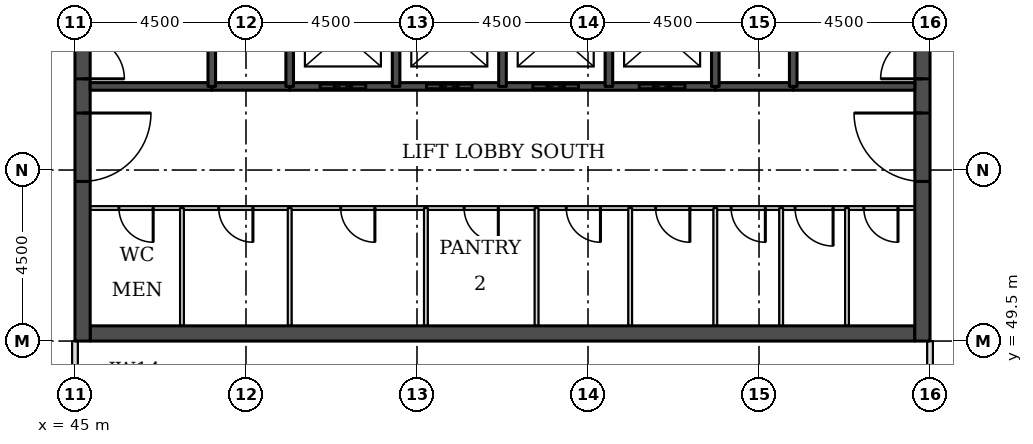
"""IFC4 building model, lengths in metres.
Left out: names, types, materials, properties, quantities, classifications, styles, units other than length and angle.
Written with IfcOpenShell. Run it as: python <this file> out.ifc"""

import sys

from ifc_helpers import new_model, si_unit, direction, frame, frame_2d, origin, place, context, subcontext, project, spatial, rectangle, extrude, element, fill, save


model = new_model("IFC4")
c1 = context("Model", 3, precision=1e-05, world=origin(), true_north=direction((0.0, 1.0)))
c2 = subcontext(c1, "Body", "Model", "MODEL_VIEW")
j1 = project(units=[si_unit("LENGTHUNIT", "METRE"), si_unit("PLANEANGLEUNIT", "RADIAN")], contexts=[c1])
p1 = place(None, origin())
s1 = spatial("IfcSite", under=j1, at=p1, CompositionType="ELEMENT")
p2 = place(p1, origin())
s2 = spatial("IfcBuilding", under=s1, at=p2, CompositionType="ELEMENT")
p3 = place(p2, frame((0.0, 0.0, 158.8)))
s3 = spatial("IfcBuildingStorey", under=s2, at=p3, CompositionType="ELEMENT", Elevation=158.8)
p4 = place(p3, frame((45.4, 49.7, 0.0), z_axis=(0.0, 0.0, 1.0), x_axis=(1.0, 0.0, 0.0)))
e1 = element("IfcWall", 1, at=p4, inside=s3, PredefinedType="SHEAR", context=c2, shape_type="SweptSolid", body=[
    extrude(rectangle(XDim=21.7, YDim=0.4, at=frame_2d((10.85, 0.0))), origin(), (0.0, 0.0, 1.0), 3.7),
])
p5 = place(p3, frame((45.2, 49.5, 0.0), z_axis=(0.0, 0.0, 1.0), x_axis=(0.0, 1.0, 0.0)))
e2 = element("IfcWall", 2, at=p5, inside=s3, PredefinedType="SHEAR", context=c2, shape_type="SweptSolid", body=[
    extrude(rectangle(XDim=22.5, YDim=0.4, at=frame_2d((11.25, 0.0))), origin(), (0.0, 0.0, 1.0), 3.7),
])
p6 = place(p5, frame((4.2, 0.0, 0.0)))
e3 = element("IfcOpeningElement", 3, at=p6, cuts=e2, PredefinedType="OPENING", context=c2, shape_type="SweptSolid", body=[
    extrude(rectangle(XDim=1.8, YDim=2.1, at=frame_2d((0.9, 1.05))), frame((0.0, 0.21, 0.0), z_axis=(0.0, -1.0, 0.0), x_axis=(1.0, 0.0, 0.0)), (0.0, 0.0, 1.0), 0.42),
])
p7 = place(p5, frame((6.9, 0.0, 0.0)))
e4 = element("IfcOpeningElement", 4, at=p7, cuts=e2, PredefinedType="OPENING", context=c2, shape_type="SweptSolid", body=[
    extrude(rectangle(XDim=1.1, YDim=2.1, at=frame_2d((0.55, 1.05))), frame((0.0, 0.21, 0.0), z_axis=(0.0, -1.0, 0.0), x_axis=(1.0, 0.0, 0.0)), (0.0, 0.0, 1.0), 0.42),
])
p8 = place(p5, frame((13.6, 0.0, 0.0)))
e5 = element("IfcOpeningElement", 5, at=p8, cuts=e2, PredefinedType="OPENING", context=c2, shape_type="SweptSolid", body=[
    extrude(rectangle(XDim=1.1, YDim=2.1, at=frame_2d((0.55, 1.05))), frame((0.0, 0.21, 0.0), z_axis=(0.0, -1.0, 0.0), x_axis=(1.0, 0.0, 0.0)), (0.0, 0.0, 1.0), 0.42),
])
p9 = place(p5, frame((16.5, 0.0, 0.0)))
e6 = element("IfcOpeningElement", 6, at=p9, cuts=e2, PredefinedType="OPENING", context=c2, shape_type="SweptSolid", body=[
    extrude(rectangle(XDim=1.8, YDim=2.1, at=frame_2d((0.9, 1.05))), frame((0.0, 0.21, 0.0), z_axis=(0.0, -1.0, 0.0), x_axis=(1.0, 0.0, 0.0)), (0.0, 0.0, 1.0), 0.42),
])
p10 = place(p3, frame((67.3, 49.5, 0.0), z_axis=(0.0, 0.0, 1.0), x_axis=(0.0, 1.0, 0.0)))
e7 = element("IfcWall", 7, at=p10, inside=s3, PredefinedType="SHEAR", context=c2, shape_type="SweptSolid", body=[
    extrude(rectangle(XDim=22.5, YDim=0.4, at=frame_2d((11.25, 0.0))), origin(), (0.0, 0.0, 1.0), 3.7),
])
p11 = place(p10, frame((4.2, 0.0, 0.0)))
e8 = element("IfcOpeningElement", 8, at=p11, cuts=e7, PredefinedType="OPENING", context=c2, shape_type="SweptSolid", body=[
    extrude(rectangle(XDim=1.8, YDim=2.1, at=frame_2d((0.9, 1.05))), frame((0.0, 0.21, 0.0), z_axis=(0.0, -1.0, 0.0), x_axis=(1.0, 0.0, 0.0)), (0.0, 0.0, 1.0), 0.42),
])
p12 = place(p10, frame((6.9, 0.0, 0.0)))
e9 = element("IfcOpeningElement", 9, at=p12, cuts=e7, PredefinedType="OPENING", context=c2, shape_type="SweptSolid", body=[
    extrude(rectangle(XDim=1.1, YDim=2.1, at=frame_2d((0.55, 1.05))), frame((0.0, 0.21, 0.0), z_axis=(0.0, -1.0, 0.0), x_axis=(1.0, 0.0, 0.0)), (0.0, 0.0, 1.0), 0.42),
])
p13 = place(p10, frame((13.6, 0.0, 0.0)))
e10 = element("IfcOpeningElement", 10, at=p13, cuts=e7, PredefinedType="OPENING", context=c2, shape_type="SweptSolid", body=[
    extrude(rectangle(XDim=1.1, YDim=2.1, at=frame_2d((0.55, 1.05))), frame((0.0, 0.21, 0.0), z_axis=(0.0, -1.0, 0.0), x_axis=(1.0, 0.0, 0.0)), (0.0, 0.0, 1.0), 0.42),
])
p14 = place(p10, frame((16.5, 0.0, 0.0)))
e11 = element("IfcOpeningElement", 11, at=p14, cuts=e7, PredefinedType="OPENING", context=c2, shape_type="SweptSolid", body=[
    extrude(rectangle(XDim=1.8, YDim=2.1, at=frame_2d((0.9, 1.05))), frame((0.0, 0.21, 0.0), z_axis=(0.0, -1.0, 0.0), x_axis=(1.0, 0.0, 0.0)), (0.0, 0.0, 1.0), 0.42),
])
p15 = place(p3, frame((67.5, 40.05, 0.0), z_axis=(0.0, 0.0, 1.0), x_axis=(0.0, 1.0, 0.0)))
e12 = element("IfcWall", 12, at=p15, inside=s3, PredefinedType="PARTITIONING", context=c2, shape_type="SweptSolid", body=[
    extrude(rectangle(XDim=9.45, YDim=0.15, at=frame_2d((4.725, 0.0))), origin(), (0.0, 0.0, 1.0), 3.022),
])
p16 = place(p3, frame((45.0, 48.0, 0.0), z_axis=(0.0, 0.0, 1.0), x_axis=(0.0, 1.0, 0.0)))
e13 = element("IfcWall", 13, at=p16, inside=s3, PredefinedType="PARTITIONING", context=c2, shape_type="SweptSolid", body=[
    extrude(rectangle(XDim=1.5, YDim=0.15, at=frame_2d((0.75, 0.0))), origin(), (0.0, 0.0, 1.0), 3.022),
])
p17 = place(p3, frame((45.4, 53.0, 0.0), z_axis=(0.0, 0.0, 1.0), x_axis=(1.0, 0.0, 0.0)))
e14 = element("IfcWall", 14, at=p17, inside=s3, PredefinedType="PARTITIONING", context=c2, shape_type="SweptSolid", body=[
    extrude(rectangle(XDim=21.7, YDim=0.1, at=frame_2d((10.85, 0.0))), origin(), (0.0, 0.0, 1.0), 3.55),
])
p18 = place(p17, frame((20.357, 0.0, 0.0)))
e15 = element("IfcOpeningElement", 15, at=p18, cuts=e14, PredefinedType="OPENING", context=c2, shape_type="SweptSolid", body=[
    extrude(rectangle(XDim=0.9, YDim=2.1, at=frame_2d((0.45, 1.05))), frame((0.0, 0.06, 0.0), z_axis=(0.0, -1.0, 0.0), x_axis=(1.0, 0.0, 0.0)), (0.0, 0.0, 1.0), 0.12),
])
p19 = place(p17, frame((18.549, 0.0, 0.0)))
e16 = element("IfcOpeningElement", 16, at=p19, cuts=e14, PredefinedType="OPENING", context=c2, shape_type="SweptSolid", body=[
    extrude(rectangle(XDim=1.0, YDim=2.1, at=frame_2d((0.5, 1.05))), frame((0.0, 0.06, 0.0), z_axis=(0.0, -1.0, 0.0), x_axis=(1.0, 0.0, 0.0)), (0.0, 0.0, 1.0), 0.12),
])
p20 = place(p17, frame((16.866, 0.0, 0.0)))
e17 = element("IfcOpeningElement", 17, at=p20, cuts=e14, PredefinedType="OPENING", context=c2, shape_type="SweptSolid", body=[
    extrude(rectangle(XDim=0.9, YDim=2.1, at=frame_2d((0.45, 1.05))), frame((0.0, 0.06, 0.0), z_axis=(0.0, -1.0, 0.0), x_axis=(1.0, 0.0, 0.0)), (0.0, 0.0, 1.0), 0.12),
])
p21 = place(p17, frame((0.758, 0.0, 0.0)))
e18 = element("IfcOpeningElement", 18, at=p21, cuts=e14, PredefinedType="OPENING", context=c2, shape_type="SweptSolid", body=[
    extrude(rectangle(XDim=0.9, YDim=2.1, at=frame_2d((0.45, 1.05))), frame((0.0, 0.06, 0.0), z_axis=(0.0, -1.0, 0.0), x_axis=(1.0, 0.0, 0.0)), (0.0, 0.0, 1.0), 0.12),
])
p22 = place(p17, frame((3.383, 0.0, 0.0)))
e19 = element("IfcOpeningElement", 19, at=p22, cuts=e14, PredefinedType="OPENING", context=c2, shape_type="SweptSolid", body=[
    extrude(rectangle(XDim=0.9, YDim=2.1, at=frame_2d((0.45, 1.05))), frame((0.0, 0.06, 0.0), z_axis=(0.0, -1.0, 0.0), x_axis=(1.0, 0.0, 0.0)), (0.0, 0.0, 1.0), 0.12),
])
p23 = place(p17, frame((6.592, 0.0, 0.0)))
e20 = element("IfcOpeningElement", 20, at=p23, cuts=e14, PredefinedType="OPENING", context=c2, shape_type="SweptSolid", body=[
    extrude(rectangle(XDim=0.9, YDim=2.1, at=frame_2d((0.45, 1.05))), frame((0.0, 0.06, 0.0), z_axis=(0.0, -1.0, 0.0), x_axis=(1.0, 0.0, 0.0)), (0.0, 0.0, 1.0), 0.12),
])
p24 = place(p17, frame((9.84, 0.0, 0.0)))
e21 = element("IfcOpeningElement", 21, at=p24, cuts=e14, PredefinedType="OPENING", context=c2, shape_type="SweptSolid", body=[
    extrude(rectangle(XDim=0.9, YDim=2.1, at=frame_2d((0.45, 1.05))), frame((0.0, 0.06, 0.0), z_axis=(0.0, -1.0, 0.0), x_axis=(1.0, 0.0, 0.0)), (0.0, 0.0, 1.0), 0.12),
])
p25 = place(p17, frame((12.528, 0.0, 0.0)))
e22 = element("IfcOpeningElement", 22, at=p25, cuts=e14, PredefinedType="OPENING", context=c2, shape_type="SweptSolid", body=[
    extrude(rectangle(XDim=0.9, YDim=2.1, at=frame_2d((0.45, 1.05))), frame((0.0, 0.06, 0.0), z_axis=(0.0, -1.0, 0.0), x_axis=(1.0, 0.0, 0.0)), (0.0, 0.0, 1.0), 0.12),
])
p26 = place(p17, frame((14.88, 0.0, 0.0)))
e23 = element("IfcOpeningElement", 23, at=p26, cuts=e14, PredefinedType="OPENING", context=c2, shape_type="SweptSolid", body=[
    extrude(rectangle(XDim=0.9, YDim=2.1, at=frame_2d((0.45, 1.05))), frame((0.0, 0.06, 0.0), z_axis=(0.0, -1.0, 0.0), x_axis=(1.0, 0.0, 0.0)), (0.0, 0.0, 1.0), 0.12),
])
for number, where, z_axis, x_axis in (
    (24, (48.6, 56.2, 0.0), (0.0, 0.0, 1.0), (1.0, 0.0, 0.0)),
    (25, (61.85, 56.2, 0.0), (0.0, 0.0, 1.0), (1.0, 0.0, 0.0)),
):
    element("IfcWall", number, at=place(p3, frame(where, z_axis=z_axis, x_axis=x_axis)), inside=s3, PredefinedType="SOLIDWALL", context=c2, shape_type="SweptSolid", body=[
        extrude(rectangle(XDim=2.05, YDim=0.2, at=frame_2d((1.025, 0.0))), origin(), (0.0, 0.0, 1.0), 3.55),
    ])
p27 = place(p3, frame((45.4, 56.2, 0.0), z_axis=(0.0, 0.0, 1.0), x_axis=(1.0, 0.0, 0.0)))
e26 = element("IfcWall", 26, at=p27, inside=s3, PredefinedType="SOLIDWALL", context=c2, shape_type="SweptSolid", body=[
    extrude(rectangle(XDim=3.2, YDim=0.2, at=frame_2d((1.6, 0.0))), origin(), (0.0, 0.0, 1.0), 3.55),
])
p28 = place(p3, frame((50.65, 56.2, 0.0), z_axis=(0.0, 0.0, 1.0), x_axis=(1.0, 0.0, 0.0)))
e27 = element("IfcWall", 27, at=p28, inside=s3, PredefinedType="SOLIDWALL", context=c2, shape_type="SweptSolid", body=[
    extrude(rectangle(XDim=11.2, YDim=0.2, at=frame_2d((5.6, 0.0))), origin(), (0.0, 0.0, 1.0), 3.55),
])
p29 = place(p28, frame((0.8, 0.0, 0.0)))
e28 = element("IfcOpeningElement", 28, at=p29, cuts=e27, PredefinedType="OPENING", context=c2, shape_type="SweptSolid", body=[
    extrude(rectangle(XDim=1.2, YDim=2.1, at=frame_2d((0.6, 1.05))), frame((0.0, 0.11, 0.0), z_axis=(0.0, -1.0, 0.0), x_axis=(1.0, 0.0, 0.0)), (0.0, 0.0, 1.0), 0.22),
])
p30 = place(p28, frame((3.6, 0.0, 0.0)))
e29 = element("IfcOpeningElement", 29, at=p30, cuts=e27, PredefinedType="OPENING", context=c2, shape_type="SweptSolid", body=[
    extrude(rectangle(XDim=1.2, YDim=2.1, at=frame_2d((0.6, 1.05))), frame((0.0, 0.11, 0.0), z_axis=(0.0, -1.0, 0.0), x_axis=(1.0, 0.0, 0.0)), (0.0, 0.0, 1.0), 0.22),
])
p31 = place(p28, frame((6.4, 0.0, 0.0)))
e30 = element("IfcOpeningElement", 30, at=p31, cuts=e27, PredefinedType="OPENING", context=c2, shape_type="SweptSolid", body=[
    extrude(rectangle(XDim=1.2, YDim=2.1, at=frame_2d((0.6, 1.05))), frame((0.0, 0.11, 0.0), z_axis=(0.0, -1.0, 0.0), x_axis=(1.0, 0.0, 0.0)), (0.0, 0.0, 1.0), 0.22),
])
p32 = place(p28, frame((9.2, 0.0, 0.0)))
e31 = element("IfcOpeningElement", 31, at=p32, cuts=e27, PredefinedType="OPENING", context=c2, shape_type="SweptSolid", body=[
    extrude(rectangle(XDim=1.2, YDim=2.1, at=frame_2d((0.6, 1.05))), frame((0.0, 0.11, 0.0), z_axis=(0.0, -1.0, 0.0), x_axis=(1.0, 0.0, 0.0)), (0.0, 0.0, 1.0), 0.22),
])
p33 = place(p3, frame((63.9, 56.2, 0.0), z_axis=(0.0, 0.0, 1.0), x_axis=(1.0, 0.0, 0.0)))
e32 = element("IfcWall", 32, at=p33, inside=s3, PredefinedType="SOLIDWALL", context=c2, shape_type="SweptSolid", body=[
    extrude(rectangle(XDim=3.2, YDim=0.2, at=frame_2d((1.6, 0.0))), origin(), (0.0, 0.0, 1.0), 3.55),
])
p34 = place(p3, frame((47.815, 49.9, 0.0), z_axis=(0.0, 0.0, 1.0), x_axis=(0.0, 1.0, 0.0)))
e33 = element("IfcWall", 33, at=p34, inside=s3, PredefinedType="PARTITIONING", context=c2, shape_type="SweptSolid", body=[
    extrude(rectangle(XDim=3.1, YDim=0.1, at=frame_2d((1.55, 0.0))), origin(), (0.0, 0.0, 1.0), 3.55),
])
p35 = place(p3, frame((48.6, 56.2, 0.0), z_axis=(0.0, 0.0, 1.0), x_axis=(0.0, 1.0, 0.0)))
e34 = element("IfcWall", 34, at=p35, inside=s3, PredefinedType="SOLIDWALL", context=c2, shape_type="SweptSolid", body=[
    extrude(rectangle(XDim=5.8, YDim=0.2, at=frame_2d((2.9, 0.0))), origin(), (0.0, 0.0, 1.0), 3.55),
])
p36 = place(p3, frame((50.65, 49.9, 0.0), z_axis=(0.0, 0.0, 1.0), x_axis=(0.0, 1.0, 0.0)))
e35 = element("IfcWall", 35, at=p36, inside=s3, PredefinedType="PARTITIONING", context=c2, shape_type="SweptSolid", body=[
    extrude(rectangle(XDim=3.1, YDim=0.1, at=frame_2d((1.55, 0.0))), origin(), (0.0, 0.0, 1.0), 3.55),
])
for number, where, z_axis, x_axis in (
    (36, (50.65, 56.2, 0.0), (0.0, 0.0, 1.0), (0.0, 1.0, 0.0)),
    (37, (53.45, 56.2, 0.0), (0.0, 0.0, 1.0), (0.0, 1.0, 0.0)),
):
    element("IfcWall", number, at=place(p3, frame(where, z_axis=z_axis, x_axis=x_axis)), inside=s3, PredefinedType="SOLIDWALL", context=c2, shape_type="SweptSolid", body=[
        extrude(rectangle(XDim=2.8, YDim=0.2, at=frame_2d((1.4, 0.0))), origin(), (0.0, 0.0, 1.0), 3.55),
    ])
p37 = place(p3, frame((54.234, 49.9, 0.0), z_axis=(0.0, 0.0, 1.0), x_axis=(0.0, 1.0, 0.0)))
e38 = element("IfcWall", 38, at=p37, inside=s3, PredefinedType="PARTITIONING", context=c2, shape_type="SweptSolid", body=[
    extrude(rectangle(XDim=3.1, YDim=0.1, at=frame_2d((1.55, 0.0))), origin(), (0.0, 0.0, 1.0), 3.55),
])
p38 = place(p3, frame((56.25, 56.2, 0.0), z_axis=(0.0, 0.0, 1.0), x_axis=(0.0, 1.0, 0.0)))
e39 = element("IfcWall", 39, at=p38, inside=s3, PredefinedType="SOLIDWALL", context=c2, shape_type="SweptSolid", body=[
    extrude(rectangle(XDim=2.8, YDim=0.2, at=frame_2d((1.4, 0.0))), origin(), (0.0, 0.0, 1.0), 3.55),
])
p39 = place(p3, frame((57.146, 49.9, 0.0), z_axis=(0.0, 0.0, 1.0), x_axis=(0.0, 1.0, 0.0)))
e40 = element("IfcWall", 40, at=p39, inside=s3, PredefinedType="PARTITIONING", context=c2, shape_type="SweptSolid", body=[
    extrude(rectangle(XDim=3.1, YDim=0.1, at=frame_2d((1.55, 0.0))), origin(), (0.0, 0.0, 1.0), 3.55),
])
p40 = place(p3, frame((59.05, 56.2, 0.0), z_axis=(0.0, 0.0, 1.0), x_axis=(0.0, 1.0, 0.0)))
e41 = element("IfcWall", 41, at=p40, inside=s3, PredefinedType="SOLIDWALL", context=c2, shape_type="SweptSolid", body=[
    extrude(rectangle(XDim=2.8, YDim=0.2, at=frame_2d((1.4, 0.0))), origin(), (0.0, 0.0, 1.0), 3.55),
])
for number, where, z_axis, x_axis in (
    (42, (59.61, 49.9, 0.0), (0.0, 0.0, 1.0), (0.0, 1.0, 0.0)),
    (43, (61.85, 49.9, 0.0), (0.0, 0.0, 1.0), (0.0, 1.0, 0.0)),
):
    element("IfcWall", number, at=place(p3, frame(where, z_axis=z_axis, x_axis=x_axis)), inside=s3, PredefinedType="PARTITIONING", context=c2, shape_type="SweptSolid", body=[
        extrude(rectangle(XDim=3.1, YDim=0.1, at=frame_2d((1.55, 0.0))), origin(), (0.0, 0.0, 1.0), 3.55),
    ])
p41 = place(p3, frame((61.85, 56.2, 0.0), z_axis=(0.0, 0.0, 1.0), x_axis=(0.0, 1.0, 0.0)))
e44 = element("IfcWall", 44, at=p41, inside=s3, PredefinedType="SOLIDWALL", context=c2, shape_type="SweptSolid", body=[
    extrude(rectangle(XDim=2.8, YDim=0.2, at=frame_2d((1.4, 0.0))), origin(), (0.0, 0.0, 1.0), 3.55),
])
p42 = place(p3, frame((63.583, 49.9, 0.0), z_axis=(0.0, 0.0, 1.0), x_axis=(0.0, 1.0, 0.0)))
e45 = element("IfcWall", 45, at=p42, inside=s3, PredefinedType="PARTITIONING", context=c2, shape_type="SweptSolid", body=[
    extrude(rectangle(XDim=3.1, YDim=0.1, at=frame_2d((1.55, 0.0))), origin(), (0.0, 0.0, 1.0), 3.55),
])
p43 = place(p3, frame((63.9, 56.2, 0.0), z_axis=(0.0, 0.0, 1.0), x_axis=(0.0, 1.0, 0.0)))
e46 = element("IfcWall", 46, at=p43, inside=s3, PredefinedType="SOLIDWALL", context=c2, shape_type="SweptSolid", body=[
    extrude(rectangle(XDim=5.8, YDim=0.2, at=frame_2d((2.9, 0.0))), origin(), (0.0, 0.0, 1.0), 3.55),
])
p44 = place(p3, frame((65.315, 49.9, 0.0), z_axis=(0.0, 0.0, 1.0), x_axis=(0.0, 1.0, 0.0)))
e47 = element("IfcWall", 47, at=p44, inside=s3, PredefinedType="PARTITIONING", context=c2, shape_type="SweptSolid", body=[
    extrude(rectangle(XDim=3.1, YDim=0.1, at=frame_2d((1.55, 0.0))), origin(), (0.0, 0.0, 1.0), 3.55),
])
p45 = place(p29, origin())
e48 = element("IfcDoor", 48, at=p45, inside=s3, OperationType="DOUBLE_DOOR_SLIDING", PredefinedType="DOOR", context=c2, shape_type="SweptSolid", body=[
    extrude(rectangle(XDim=1.2, YDim=2.1, at=frame_2d((0.6, 1.05))), frame((0.0, 0.025, 0.0), z_axis=(0.0, -1.0, 0.0), x_axis=(1.0, 0.0, 0.0)), (0.0, 0.0, 1.0), 0.05),
])
fill(e28, e48)
p46 = place(p30, origin())
e49 = element("IfcDoor", 49, at=p46, inside=s3, OperationType="DOUBLE_DOOR_SLIDING", PredefinedType="DOOR", context=c2, shape_type="SweptSolid", body=[
    extrude(rectangle(XDim=1.2, YDim=2.1, at=frame_2d((0.6, 1.05))), frame((0.0, 0.025, 0.0), z_axis=(0.0, -1.0, 0.0), x_axis=(1.0, 0.0, 0.0)), (0.0, 0.0, 1.0), 0.05),
])
fill(e29, e49)
p47 = place(p31, origin())
e50 = element("IfcDoor", 50, at=p47, inside=s3, OperationType="DOUBLE_DOOR_SLIDING", PredefinedType="DOOR", context=c2, shape_type="SweptSolid", body=[
    extrude(rectangle(XDim=1.2, YDim=2.1, at=frame_2d((0.6, 1.05))), frame((0.0, 0.025, 0.0), z_axis=(0.0, -1.0, 0.0), x_axis=(1.0, 0.0, 0.0)), (0.0, 0.0, 1.0), 0.05),
])
fill(e30, e50)
p48 = place(p32, origin())
e51 = element("IfcDoor", 51, at=p48, inside=s3, OperationType="DOUBLE_DOOR_SLIDING", PredefinedType="DOOR", context=c2, shape_type="SweptSolid", body=[
    extrude(rectangle(XDim=1.2, YDim=2.1, at=frame_2d((0.6, 1.05))), frame((0.0, 0.025, 0.0), z_axis=(0.0, -1.0, 0.0), x_axis=(1.0, 0.0, 0.0)), (0.0, 0.0, 1.0), 0.05),
])
fill(e31, e51)
p49 = place(p6, frame((1.8, 0.0, 0.0), z_axis=(0.0, 0.0, 1.0), x_axis=(-1.0, 0.0, 0.0)))
e52 = element("IfcDoor", 52, at=p49, inside=s3, OperationType="SINGLE_SWING_LEFT", PredefinedType="DOOR", context=c2, shape_type="SweptSolid", body=[
    extrude(rectangle(XDim=1.8, YDim=2.1, at=frame_2d((0.9, 1.05))), frame((0.0, 0.025, 0.0), z_axis=(0.0, -1.0, 0.0), x_axis=(1.0, 0.0, 0.0)), (0.0, 0.0, 1.0), 0.05),
])
fill(e3, e52)
p50 = place(p7, frame((1.1, 0.0, 0.0), z_axis=(0.0, 0.0, 1.0), x_axis=(-1.0, 0.0, 0.0)))
e53 = element("IfcDoor", 53, at=p50, inside=s3, OperationType="SINGLE_SWING_RIGHT", PredefinedType="DOOR", context=c2, shape_type="SweptSolid", body=[
    extrude(rectangle(XDim=1.1, YDim=2.1, at=frame_2d((0.55, 1.05))), frame((0.0, 0.025, 0.0), z_axis=(0.0, -1.0, 0.0), x_axis=(1.0, 0.0, 0.0)), (0.0, 0.0, 1.0), 0.05),
])
fill(e4, e53)
p51 = place(p11, origin())
e54 = element("IfcDoor", 54, at=p51, inside=s3, OperationType="SINGLE_SWING_RIGHT", PredefinedType="DOOR", context=c2, shape_type="SweptSolid", body=[
    extrude(rectangle(XDim=1.8, YDim=2.1, at=frame_2d((0.9, 1.05))), frame((0.0, 0.025, 0.0), z_axis=(0.0, -1.0, 0.0), x_axis=(1.0, 0.0, 0.0)), (0.0, 0.0, 1.0), 0.05),
])
fill(e8, e54)
p52 = place(p12, origin())
e55 = element("IfcDoor", 55, at=p52, inside=s3, OperationType="SINGLE_SWING_LEFT", PredefinedType="DOOR", context=c2, shape_type="SweptSolid", body=[
    extrude(rectangle(XDim=1.1, YDim=2.1, at=frame_2d((0.55, 1.05))), frame((0.0, 0.025, 0.0), z_axis=(0.0, -1.0, 0.0), x_axis=(1.0, 0.0, 0.0)), (0.0, 0.0, 1.0), 0.05),
])
fill(e9, e55)
p53 = place(p18, frame((0.9, 0.0, 0.0), z_axis=(0.0, 0.0, 1.0), x_axis=(-1.0, 0.0, 0.0)))
e56 = element("IfcDoor", 56, at=p53, inside=s3, OperationType="SINGLE_SWING_LEFT", PredefinedType="DOOR", context=c2, shape_type="SweptSolid", body=[
    extrude(rectangle(XDim=0.9, YDim=2.1, at=frame_2d((0.45, 1.05))), frame((0.0, 0.025, 0.0), z_axis=(0.0, -1.0, 0.0), x_axis=(1.0, 0.0, 0.0)), (0.0, 0.0, 1.0), 0.05),
])
fill(e15, e56)
p54 = place(p19, frame((1.0, 0.0, 0.0), z_axis=(0.0, 0.0, 1.0), x_axis=(-1.0, 0.0, 0.0)))
e57 = element("IfcDoor", 57, at=p54, inside=s3, OperationType="SINGLE_SWING_LEFT", PredefinedType="DOOR", context=c2, shape_type="SweptSolid", body=[
    extrude(rectangle(XDim=1.0, YDim=2.1, at=frame_2d((0.5, 1.05))), frame((0.0, 0.025, 0.0), z_axis=(0.0, -1.0, 0.0), x_axis=(1.0, 0.0, 0.0)), (0.0, 0.0, 1.0), 0.05),
])
fill(e16, e57)
p55 = place(p20, frame((0.9, 0.0, 0.0), z_axis=(0.0, 0.0, 1.0), x_axis=(-1.0, 0.0, 0.0)))
e58 = element("IfcDoor", 58, at=p55, inside=s3, OperationType="SINGLE_SWING_LEFT", PredefinedType="DOOR", context=c2, shape_type="SweptSolid", body=[
    extrude(rectangle(XDim=0.9, YDim=2.1, at=frame_2d((0.45, 1.05))), frame((0.0, 0.025, 0.0), z_axis=(0.0, -1.0, 0.0), x_axis=(1.0, 0.0, 0.0)), (0.0, 0.0, 1.0), 0.05),
])
fill(e17, e58)
p56 = place(p21, frame((0.9, 0.0, 0.0), z_axis=(0.0, 0.0, 1.0), x_axis=(-1.0, 0.0, 0.0)))
e59 = element("IfcDoor", 59, at=p56, inside=s3, OperationType="SINGLE_SWING_LEFT", PredefinedType="DOOR", context=c2, shape_type="SweptSolid", body=[
    extrude(rectangle(XDim=0.9, YDim=2.1, at=frame_2d((0.45, 1.05))), frame((0.0, 0.025, 0.0), z_axis=(0.0, -1.0, 0.0), x_axis=(1.0, 0.0, 0.0)), (0.0, 0.0, 1.0), 0.05),
])
fill(e18, e59)
p57 = place(p22, frame((0.9, 0.0, 0.0), z_axis=(0.0, 0.0, 1.0), x_axis=(-1.0, 0.0, 0.0)))
e60 = element("IfcDoor", 60, at=p57, inside=s3, OperationType="SINGLE_SWING_LEFT", PredefinedType="DOOR", context=c2, shape_type="SweptSolid", body=[
    extrude(rectangle(XDim=0.9, YDim=2.1, at=frame_2d((0.45, 1.05))), frame((0.0, 0.025, 0.0), z_axis=(0.0, -1.0, 0.0), x_axis=(1.0, 0.0, 0.0)), (0.0, 0.0, 1.0), 0.05),
])
fill(e19, e60)
p58 = place(p23, frame((0.9, 0.0, 0.0), z_axis=(0.0, 0.0, 1.0), x_axis=(-1.0, 0.0, 0.0)))
e61 = element("IfcDoor", 61, at=p58, inside=s3, OperationType="SINGLE_SWING_LEFT", PredefinedType="DOOR", context=c2, shape_type="SweptSolid", body=[
    extrude(rectangle(XDim=0.9, YDim=2.1, at=frame_2d((0.45, 1.05))), frame((0.0, 0.025, 0.0), z_axis=(0.0, -1.0, 0.0), x_axis=(1.0, 0.0, 0.0)), (0.0, 0.0, 1.0), 0.05),
])
fill(e20, e61)
p59 = place(p24, frame((0.9, 0.0, 0.0), z_axis=(0.0, 0.0, 1.0), x_axis=(-1.0, 0.0, 0.0)))
e62 = element("IfcDoor", 62, at=p59, inside=s3, OperationType="SINGLE_SWING_LEFT", PredefinedType="DOOR", context=c2, shape_type="SweptSolid", body=[
    extrude(rectangle(XDim=0.9, YDim=2.1, at=frame_2d((0.45, 1.05))), frame((0.0, 0.025, 0.0), z_axis=(0.0, -1.0, 0.0), x_axis=(1.0, 0.0, 0.0)), (0.0, 0.0, 1.0), 0.05),
])
fill(e21, e62)
p60 = place(p25, frame((0.9, 0.0, 0.0), z_axis=(0.0, 0.0, 1.0), x_axis=(-1.0, 0.0, 0.0)))
e63 = element("IfcDoor", 63, at=p60, inside=s3, OperationType="SINGLE_SWING_LEFT", PredefinedType="DOOR", context=c2, shape_type="SweptSolid", body=[
    extrude(rectangle(XDim=0.9, YDim=2.1, at=frame_2d((0.45, 1.05))), frame((0.0, 0.025, 0.0), z_axis=(0.0, -1.0, 0.0), x_axis=(1.0, 0.0, 0.0)), (0.0, 0.0, 1.0), 0.05),
])
fill(e22, e63)
p61 = place(p26, frame((0.9, 0.0, 0.0), z_axis=(0.0, 0.0, 1.0), x_axis=(-1.0, 0.0, 0.0)))
e64 = element("IfcDoor", 64, at=p61, inside=s3, OperationType="SINGLE_SWING_LEFT", PredefinedType="DOOR", context=c2, shape_type="SweptSolid", body=[
    extrude(rectangle(XDim=0.9, YDim=2.1, at=frame_2d((0.45, 1.05))), frame((0.0, 0.025, 0.0), z_axis=(0.0, -1.0, 0.0), x_axis=(1.0, 0.0, 0.0)), (0.0, 0.0, 1.0), 0.05),
])
fill(e23, e64)
save(model, sys.argv[1])
